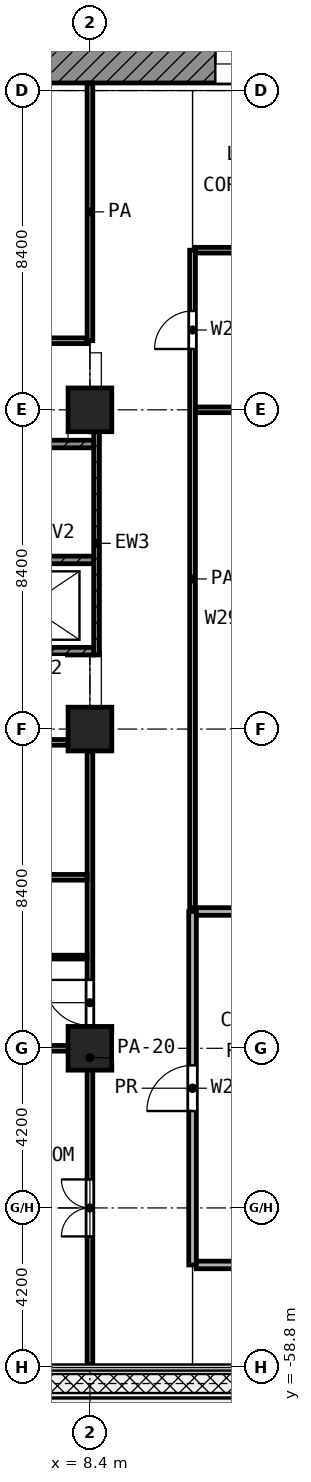
"""IFC4 building model, lengths in metres.
Left out: names, types, materials, properties, quantities, classifications, styles, units other than length and angle.
Written with IfcOpenShell. Run it as: python <this file> out.ifc"""

import sys

from ifc_helpers import new_model, si_unit, direction, frame, frame_2d, origin, origin_2d, place, context, subcontext, project, spatial, rectangle, extrude, element, fill, save


model = new_model("IFC4")
c1 = context("Model", 3, precision=1e-05, world=origin(), true_north=direction((0.0, 1.0)))
c2 = subcontext(c1, "Body", "Model", "MODEL_VIEW")
j1 = project(units=[si_unit("LENGTHUNIT", "METRE"), si_unit("PLANEANGLEUNIT", "RADIAN")], contexts=[c1])
p1 = place(None, origin())
s1 = spatial("IfcSite", under=j1, at=p1, CompositionType="ELEMENT")
p2 = place(p1, origin())
s2 = spatial("IfcBuilding", under=s1, at=p2, CompositionType="ELEMENT")
p3 = place(p2, frame((0.0, 0.0, 128.2)))
s3 = spatial("IfcBuildingStorey", under=s2, at=p3, CompositionType="ELEMENT", Elevation=128.2)
for number, where, z_axis, x_axis in (
    (1, (8.4, -33.6, 0.0), (0.0, 0.0, 1.0), (1.0, 0.0, 0.0)),
    (2, (8.4, -42.0, 0.0), (0.0, 0.0, 1.0), (1.0, 0.0, 0.0)),
    (3, (8.4, -50.4, 0.0), (0.0, 0.0, 1.0), (1.0, 0.0, 0.0)),
):
    element("IfcColumn", number, at=place(p3, frame(where, z_axis=z_axis, x_axis=x_axis)), inside=s3, PredefinedType="COLUMN", context=c2, shape_type="SweptSolid", body=[
        extrude(rectangle(XDim=1.15, YDim=1.15, at=origin_2d()), origin(), (0.0, 0.0, 1.0), 4.2),
    ])
p4 = place(p3, frame((5.4, -24.5, 0.0), z_axis=(0.0, 0.0, 1.0), x_axis=(1.0, 0.0, 0.0)))
e4 = element("IfcWall", 4, at=p4, inside=s3, PredefinedType="SHEAR", context=c2, shape_type="SweptSolid", body=[
    extrude(rectangle(XDim=18.6, YDim=1.0, at=frame_2d((9.3, 0.0))), origin(), (0.0, 0.0, 1.0), 3.6),
])
p5 = place(p4, frame((6.3, 0.0, 0.0)))
e5 = element("IfcOpeningElement", 5, at=p5, cuts=e4, PredefinedType="OPENING", context=c2, shape_type="SweptSolid", body=[
    extrude(rectangle(XDim=1.8, YDim=2.1, at=frame_2d((0.9, 1.05))), frame((0.0, 0.51, 0.0), z_axis=(0.0, -1.0, 0.0), x_axis=(1.0, 0.0, 0.0)), (0.0, 0.0, 1.0), 1.02),
])
p6 = place(p3, frame((8.575, -40.05, 0.0), z_axis=(0.0, 0.0, 1.0), x_axis=(0.0, 1.0, 0.0)))
e6 = element("IfcWall", 6, at=p6, inside=s3, PredefinedType="SHEAR", context=c2, shape_type="SweptSolid", body=[
    extrude(rectangle(XDim=5.875, YDim=0.15, at=frame_2d((2.938, 0.0))), origin(), (0.0, 0.0, 1.0), 3.6),
])
p7 = place(p3, frame((0.45, -34.5, 0.0), z_axis=(0.0, 0.0, 1.0), x_axis=(1.0, 0.0, 0.0)))
e7 = element("IfcWall", 7, at=p7, inside=s3, PredefinedType="SHEAR", context=c2, shape_type="SweptSolid", body=[
    extrude(rectangle(XDim=8.05, YDim=0.2, at=frame_2d((4.025, 0.0))), origin(), (0.0, 0.0, 1.0), 3.6),
])
p8 = place(p7, frame((0.75, 0.0, 0.0)))
e8 = element("IfcOpeningElement", 8, at=p8, cuts=e7, PredefinedType="OPENING", context=c2, shape_type="SweptSolid", body=[
    extrude(rectangle(XDim=1.1, YDim=2.1, at=frame_2d((0.55, 1.05))), frame((0.0, 0.11, 0.0), z_axis=(0.0, -1.0, 0.0), x_axis=(1.0, 0.0, 0.0)), (0.0, 0.0, 1.0), 0.22),
])
p9 = place(p3, frame((0.45, -37.55, 0.0), z_axis=(0.0, 0.0, 1.0), x_axis=(1.0, 0.0, 0.0)))
e9 = element("IfcWall", 9, at=p9, inside=s3, PredefinedType="SHEAR", context=c2, shape_type="SweptSolid", body=[
    extrude(rectangle(XDim=8.05, YDim=0.2, at=frame_2d((4.025, 0.0))), origin(), (0.0, 0.0, 1.0), 3.6),
])
p10 = place(p9, frame((0.1, 0.0, 0.0)))
e10 = element("IfcOpeningElement", 10, at=p10, cuts=e9, PredefinedType="OPENING", context=c2, shape_type="SweptSolid", body=[
    extrude(rectangle(XDim=1.1, YDim=2.1, at=frame_2d((0.55, 1.05))), frame((0.0, 0.11, 0.0), z_axis=(0.0, -1.0, 0.0), x_axis=(1.0, 0.0, 0.0)), (0.0, 0.0, 1.0), 0.22),
])
p11 = place(p3, frame((0.45, -39.95, 0.0), z_axis=(0.0, 0.0, 1.0), x_axis=(1.0, 0.0, 0.0)))
e11 = element("IfcWall", 11, at=p11, inside=s3, PredefinedType="SHEAR", context=c2, shape_type="SweptSolid", body=[
    extrude(rectangle(XDim=8.05, YDim=0.2, at=frame_2d((4.025, 0.0))), origin(), (0.0, 0.0, 1.0), 3.6),
])
p12 = place(p11, frame((2.0, 0.0, 0.0)))
e12 = element("IfcOpeningElement", 12, at=p12, cuts=e11, PredefinedType="OPENING", context=c2, shape_type="SweptSolid", body=[
    extrude(rectangle(XDim=1.1, YDim=2.1, at=frame_2d((0.55, 1.05))), frame((0.0, 0.11, 0.0), z_axis=(0.0, -1.0, 0.0), x_axis=(1.0, 0.0, 0.0)), (0.0, 0.0, 1.0), 0.22),
])
p13 = place(p3, frame((5.75, -48.0, 0.0), z_axis=(0.0, 0.0, 1.0), x_axis=(1.0, 0.0, 0.0)))
e13 = element("IfcWall", 13, at=p13, inside=s3, PredefinedType="PARTITIONING", context=c2, shape_type="SweptSolid", body=[
    extrude(rectangle(XDim=2.575, YDim=0.1, at=frame_2d((1.288, 0.0))), origin(), (0.0, 0.0, 1.0), 3.6),
])
for number, where, z_axis, x_axis in (
    (14, (0.08, -50.4, 0.0), (0.0, 0.0, 1.0), (1.0, 0.0, 0.0)),
    (15, (0.08, -45.9, 0.0), (0.0, 0.0, 1.0), (1.0, 0.0, 0.0)),
):
    element("IfcWall", number, at=place(p3, frame(where, z_axis=z_axis, x_axis=x_axis)), inside=s3, PredefinedType="PARTITIONING", context=c2, shape_type="SweptSolid", body=[
        extrude(rectangle(XDim=8.245, YDim=0.15, at=frame_2d((4.123, 0.0))), origin(), (0.0, 0.0, 1.0), 3.6),
    ])
p14 = place(p3, frame((2.327, -42.35, 0.0), z_axis=(0.0, 0.0, 1.0), x_axis=(1.0, 0.0, 0.0)))
e16 = element("IfcWall", 16, at=p14, inside=s3, PredefinedType="PARTITIONING", context=c2, shape_type="SweptSolid", body=[
    extrude(rectangle(XDim=5.498, YDim=0.15, at=frame_2d((2.749, 0.0))), origin(), (0.0, 0.0, 1.0), 3.6),
])
p15 = place(p14, frame((2.261, 0.0, 0.0)))
e17 = element("IfcOpeningElement", 17, at=p15, cuts=e16, PredefinedType="OPENING", context=c2, shape_type="SweptSolid", body=[
    extrude(rectangle(XDim=0.9, YDim=2.1, at=frame_2d((0.45, 1.05))), frame((0.0, 0.085, 0.0), z_axis=(0.0, -1.0, 0.0), x_axis=(1.0, 0.0, 0.0)), (0.0, 0.0, 1.0), 0.17),
])
p16 = place(p3, frame((11.175, -33.6, 0.0), z_axis=(0.0, 0.0, 1.0), x_axis=(1.0, 0.0, 0.0)))
e18 = element("IfcWall", 18, at=p16, inside=s3, PredefinedType="PARTITIONING", context=c2, shape_type="SweptSolid", body=[
    extrude(rectangle(XDim=2.85, YDim=0.15, at=frame_2d((1.425, 0.0))), origin(), (0.0, 0.0, 1.0), 3.6),
])
p17 = place(p3, frame((1.079, -31.782, 0.0), z_axis=(0.0, 0.0, 1.0), x_axis=(1.0, 0.0, 0.0)))
e19 = element("IfcWall", 19, at=p17, inside=s3, PredefinedType="PARTITIONING", context=c2, shape_type="SweptSolid", body=[
    extrude(rectangle(XDim=7.246, YDim=0.15, at=frame_2d((3.623, 0.0))), origin(), (0.0, 0.0, 1.0), 3.6),
])
p18 = place(p17, frame((2.873, 0.0, 0.0)))
e20 = element("IfcOpeningElement", 20, at=p18, cuts=e19, PredefinedType="OPENING", context=c2, shape_type="SweptSolid", body=[
    extrude(rectangle(XDim=1.5, YDim=2.1, at=frame_2d((0.75, 1.05))), frame((0.0, 0.085, 0.0), z_axis=(0.0, -1.0, 0.0), x_axis=(1.0, 0.0, 0.0)), (0.0, 0.0, 1.0), 0.17),
])
p19 = place(p3, frame((11.175, -29.4, 0.0), z_axis=(0.0, 0.0, 1.0), x_axis=(1.0, 0.0, 0.0)))
e21 = element("IfcWall", 21, at=p19, inside=s3, PredefinedType="PARTITIONING", context=c2, shape_type="SweptSolid", body=[
    extrude(rectangle(XDim=2.85, YDim=0.15, at=frame_2d((1.425, 0.0))), origin(), (0.0, 0.0, 1.0), 3.6),
])
p20 = place(p3, frame((8.4, -58.72, 0.0), z_axis=(0.0, 0.0, 1.0), x_axis=(0.0, 1.0, 0.0)))
e22 = element("IfcWall", 22, at=p20, inside=s3, PredefinedType="PARTITIONING", context=c2, shape_type="SweptSolid", body=[
    extrude(rectangle(XDim=16.145, YDim=0.15, at=frame_2d((8.073, 0.0))), origin(), (0.0, 0.0, 1.0), 2.7),
])
p21 = place(p20, frame((8.92, 0.0, 0.0)))
e23 = element("IfcOpeningElement", 23, at=p21, cuts=e22, PredefinedType="OPENING", context=c2, shape_type="SweptSolid", body=[
    extrude(rectangle(XDim=1.2, YDim=2.1, at=frame_2d((0.6, 1.05))), frame((0.0, 0.085, 0.0), z_axis=(0.0, -1.0, 0.0), x_axis=(1.0, 0.0, 0.0)), (0.0, 0.0, 1.0), 0.17),
])
p22 = place(p20, frame((3.37, 0.0, 0.0)))
e24 = element("IfcOpeningElement", 24, at=p22, cuts=e22, PredefinedType="OPENING", context=c2, shape_type="SweptSolid", body=[
    extrude(rectangle(XDim=1.5, YDim=2.1, at=frame_2d((0.75, 1.05))), frame((0.0, 0.085, 0.0), z_axis=(0.0, -1.0, 0.0), x_axis=(1.0, 0.0, 0.0)), (0.0, 0.0, 1.0), 0.17),
])
p23 = place(p3, frame((8.4, -31.782, 0.0), z_axis=(0.0, 0.0, 1.0), x_axis=(0.0, 1.0, 0.0)))
e25 = element("IfcWall", 25, at=p23, inside=s3, PredefinedType="PARTITIONING", context=c2, shape_type="SweptSolid", body=[
    extrude(rectangle(XDim=6.782, YDim=0.15, at=frame_2d((3.391, 0.0))), origin(), (0.0, 0.0, 1.0), 3.6),
])
p24 = place(p3, frame((11.1, -46.7, 0.0), z_axis=(0.0, 0.0, 1.0), x_axis=(0.0, 1.0, 0.0)))
e26 = element("IfcWall", 26, at=p24, inside=s3, PredefinedType="PARTITIONING", context=c2, shape_type="SweptSolid", body=[
    extrude(rectangle(XDim=17.3, YDim=0.15, at=frame_2d((8.65, 0.0))), origin(), (0.0, 0.0, 1.0), 3.6),
])
p25 = place(p24, frame((14.7, 0.0, 0.0)))
e27 = element("IfcOpeningElement", 27, at=p25, cuts=e26, PredefinedType="OPENING", context=c2, shape_type="SweptSolid", body=[
    extrude(rectangle(XDim=1.0, YDim=2.1, at=frame_2d((0.5, 1.05))), frame((0.0, 0.085, 0.0), z_axis=(0.0, -1.0, 0.0), x_axis=(1.0, 0.0, 0.0)), (0.0, 0.0, 1.0), 0.17),
])
for number, where, z_axis, x_axis in (
    (28, (11.2, -56.1, 0.0), (0.0, 0.0, 1.0), (1.0, 0.0, 0.0)),
    (29, (11.2, -46.8, 0.0), (0.0, 0.0, 1.0), (1.0, 0.0, 0.0)),
):
    element("IfcWall", number, at=place(p3, frame(where, z_axis=z_axis, x_axis=x_axis)), inside=s3, PredefinedType="PARTITIONING", context=c2, shape_type="SweptSolid", body=[
        extrude(rectangle(XDim=2.8, YDim=0.2, at=frame_2d((1.4, 0.0))), origin(), (0.0, 0.0, 1.0), 3.6),
    ])
p26 = place(p3, frame((11.1, -56.1, 0.0), z_axis=(0.0, 0.0, 1.0), x_axis=(0.0, 1.0, 0.0)))
e30 = element("IfcWall", 30, at=p26, inside=s3, PredefinedType="PARTITIONING", context=c2, shape_type="SweptSolid", body=[
    extrude(rectangle(XDim=9.3, YDim=0.2, at=frame_2d((4.65, 0.0))), origin(), (0.0, 0.0, 1.0), 3.6),
])
p27 = place(p26, frame((4.05, 0.0, 0.0)))
e31 = element("IfcOpeningElement", 31, at=p27, cuts=e30, PredefinedType="OPENING", context=c2, shape_type="SweptSolid", body=[
    extrude(rectangle(XDim=1.2, YDim=2.1, at=frame_2d((0.6, 1.05))), frame((0.0, 0.11, 0.0), z_axis=(0.0, -1.0, 0.0), x_axis=(1.0, 0.0, 0.0)), (0.0, 0.0, 1.0), 0.22),
])
p28 = place(p5, origin())
e32 = element("IfcDoor", 32, at=p28, inside=s3, OperationType="DOUBLE_DOOR_SINGLE_SWING", PredefinedType="DOOR", context=c2, shape_type="SweptSolid", body=[
    extrude(rectangle(XDim=1.8, YDim=2.1, at=frame_2d((0.9, 1.05))), frame((0.0, 0.025, 0.0), z_axis=(0.0, -1.0, 0.0), x_axis=(1.0, 0.0, 0.0)), (0.0, 0.0, 1.0), 0.05),
])
fill(e5, e32)
p29 = place(p21, origin())
e33 = element("IfcDoor", 33, at=p29, inside=s3, OperationType="SINGLE_SWING_RIGHT", PredefinedType="DOOR", context=c2, shape_type="SweptSolid", body=[
    extrude(rectangle(XDim=1.2, YDim=2.1, at=frame_2d((0.6, 1.05))), frame((0.0, 0.025, 0.0), z_axis=(0.0, -1.0, 0.0), x_axis=(1.0, 0.0, 0.0)), (0.0, 0.0, 1.0), 0.05),
])
fill(e23, e33)
p30 = place(p22, origin())
e34 = element("IfcDoor", 34, at=p30, inside=s3, OperationType="DOUBLE_DOOR_SINGLE_SWING", PredefinedType="DOOR", context=c2, shape_type="SweptSolid", body=[
    extrude(rectangle(XDim=1.5, YDim=2.1, at=frame_2d((0.75, 1.05))), frame((0.0, 0.025, 0.0), z_axis=(0.0, -1.0, 0.0), x_axis=(1.0, 0.0, 0.0)), (0.0, 0.0, 1.0), 0.05),
])
fill(e24, e34)
p31 = place(p25, origin())
e35 = element("IfcDoor", 35, at=p31, inside=s3, OperationType="SINGLE_SWING_LEFT", PredefinedType="DOOR", context=c2, shape_type="SweptSolid", body=[
    extrude(rectangle(XDim=1.0, YDim=2.1, at=frame_2d((0.5, 1.05))), frame((0.0, 0.025, 0.0), z_axis=(0.0, -1.0, 0.0), x_axis=(1.0, 0.0, 0.0)), (0.0, 0.0, 1.0), 0.05),
])
fill(e27, e35)
p32 = place(p27, origin())
e36 = element("IfcDoor", 36, at=p32, inside=s3, OperationType="SINGLE_SWING_LEFT", PredefinedType="DOOR", context=c2, shape_type="SweptSolid", body=[
    extrude(rectangle(XDim=1.2, YDim=2.1, at=frame_2d((0.6, 1.05))), frame((0.0, 0.025, 0.0), z_axis=(0.0, -1.0, 0.0), x_axis=(1.0, 0.0, 0.0)), (0.0, 0.0, 1.0), 0.05),
])
fill(e31, e36)
save(model, sys.argv[1])
